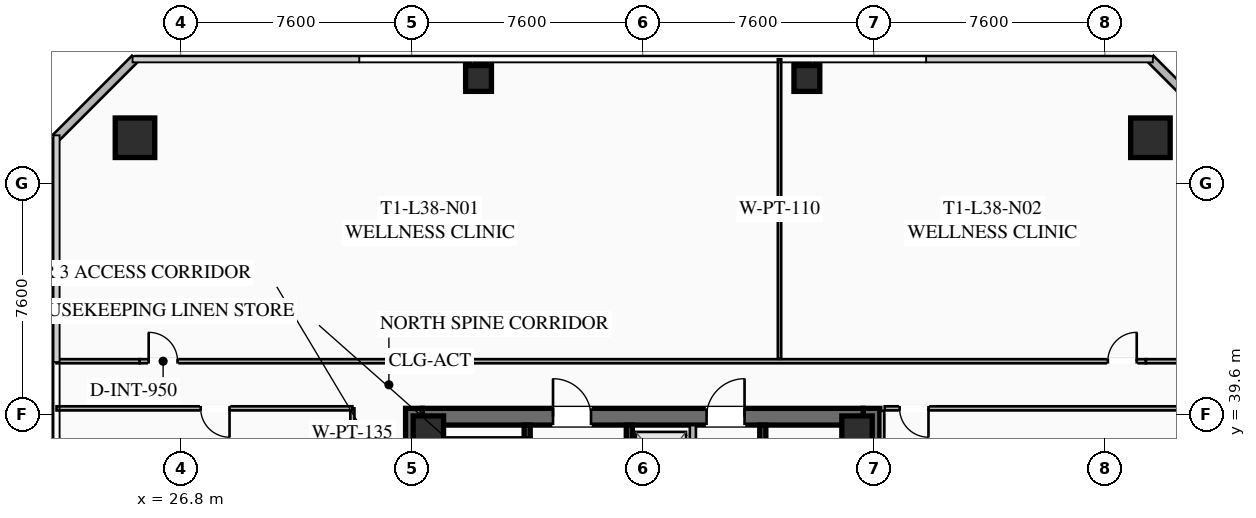
"""IFC4 building model, lengths in metres.
Left out: names, types, materials, properties, quantities, classifications, styles, units other than length and angle.
Written with IfcOpenShell. Run it as: python <this file> out.ifc"""

import sys

from ifc_helpers import new_model, si_unit, direction, frame, frame_2d, origin, origin_2d, place, context, subcontext, project, spatial, rectangle, hollow_rectangle, extrude, element, fill, save


model = new_model("IFC4")
c1 = context("Model", 3, precision=1e-05, world=origin(), true_north=direction((0.0, 1.0)))
c2 = subcontext(c1, "Body", "Model", "MODEL_VIEW")
j1 = project(units=[si_unit("LENGTHUNIT", "METRE"), si_unit("PLANEANGLEUNIT", "RADIAN")], contexts=[c1])
p1 = place(None, origin())
s1 = spatial("IfcSite", under=j1, at=p1, CompositionType="ELEMENT")
p2 = place(p1, origin())
s2 = spatial("IfcBuilding", under=s1, at=p2, CompositionType="ELEMENT")
p3 = place(p2, frame((0.0, 0.0, 142.8)))
s3 = spatial("IfcBuildingStorey", under=s2, at=p3, CompositionType="ELEMENT", Elevation=142.8)
for number, where, z_axis, x_axis in (
    (1, (34.475, 24.2, 0.0), (0.0, 0.0, 1.0), (0.0, 1.0, 0.0)),
    (2, (49.525, 39.8, 0.0), (0.0, 0.0, 1.0), (0.0, -1.0, 0.0)),
):
    element("IfcWall", number, at=place(p3, frame(where, z_axis=z_axis, x_axis=x_axis)), inside=s3, PredefinedType="SHEAR", context=c2, shape_type="SweptSolid", body=[
        extrude(rectangle(XDim=15.6, YDim=0.55, at=frame_2d((7.8, 0.0))), origin(), (0.0, 0.0, 1.0), 3.55),
    ])
p4 = place(p3, frame((34.75, 39.525, 0.0), z_axis=(0.0, 0.0, 1.0), x_axis=(1.0, 0.0, 0.0)))
e3 = element("IfcWall", 3, at=p4, inside=s3, PredefinedType="SHEAR", context=c2, shape_type="SweptSolid", body=[
    extrude(rectangle(XDim=14.5, YDim=0.55, at=frame_2d((7.25, 0.0))), origin(), (0.0, 0.0, 1.0), 3.55),
])
p5 = place(p4, frame((4.3, 0.0, 0.0)))
e4 = element("IfcOpeningElement", 4, at=p5, cuts=e3, PredefinedType="OPENING", context=c2, shape_type="SweptSolid", body=[
    extrude(rectangle(XDim=1.25, YDim=2.25, at=frame_2d((0.625, 1.125))), frame((0.0, 0.285, 0.0), z_axis=(0.0, -1.0, 0.0), x_axis=(1.0, 0.0, 0.0)), (0.0, 0.0, 1.0), 0.57),
])
p6 = place(p4, frame((9.35, 0.0, 0.0)))
e5 = element("IfcOpeningElement", 5, at=p6, cuts=e3, PredefinedType="OPENING", context=c2, shape_type="SweptSolid", body=[
    extrude(rectangle(XDim=1.25, YDim=2.25, at=frame_2d((0.625, 1.125))), frame((0.0, 0.285, 0.0), z_axis=(0.0, -1.0, 0.0), x_axis=(1.0, 0.0, 0.0)), (0.0, 0.0, 1.0), 0.57),
])
for number, where, z_axis, x_axis in (
    (6, (49.05, 39.05, 0.0), (0.0, 0.0, 1.0), (1.0, 0.0, 0.0)),
    (7, (34.95, 39.05, 0.0), (0.0, 0.0, 1.0), (1.0, 0.0, 0.0)),
):
    element("IfcColumn", number, at=place(p3, frame(where, z_axis=z_axis, x_axis=x_axis)), inside=s3, PredefinedType="COLUMN", context=c2, shape_type="SweptSolid", body=[
        extrude(hollow_rectangle(XDim=1.0, YDim=1.0, WallThickness=0.04, at=origin_2d()), origin(), (0.0, 0.0, 1.0), 3.37),
    ])
for number, where, z_axis, x_axis in (
    (8, (58.7, 48.7, 0.0), (0.0, 0.0, 1.0), (1.0, 0.0, 0.0)),
    (9, (25.3, 48.7, 0.0), (0.0, 0.0, 1.0), (1.0, 0.0, 0.0)),
):
    element("IfcColumn", number, at=place(p3, frame(where, z_axis=z_axis, x_axis=x_axis)), inside=s3, PredefinedType="COLUMN", context=c2, shape_type="SweptSolid", body=[
        extrude(hollow_rectangle(XDim=1.3, YDim=1.3, WallThickness=0.05, at=origin_2d()), origin(), (0.0, 0.0, 1.0), 3.37),
    ])
for number, where, z_axis, x_axis in (
    (10, (47.4, 50.65, 0.0), (0.0, 0.0, 1.0), (1.0, 0.0, 0.0)),
    (11, (36.6, 50.65, 0.0), (0.0, 0.0, 1.0), (1.0, 0.0, 0.0)),
):
    element("IfcColumn", number, at=place(p3, frame(where, z_axis=z_axis, x_axis=x_axis)), inside=s3, PredefinedType="COLUMN", context=c2, shape_type="SweptSolid", body=[
        extrude(hollow_rectangle(XDim=0.85, YDim=0.85, WallThickness=0.035, at=origin_2d()), origin(), (0.0, 0.0, 1.0), 3.37),
    ])
for number, where, z_axis, x_axis in (
    (12, (22.7, 48.7, 0.0), (0.0, 0.0, 1.0), (0.707, 0.707, 0.0)),
    (13, (58.7, 51.3, 0.0), (0.0, 0.0, 1.0), (0.707, -0.707, 0.0)),
):
    element("IfcWall", number, at=place(p3, frame(where, z_axis=z_axis, x_axis=x_axis)), inside=s3, PredefinedType="SOLIDWALL", context=c2, shape_type="SweptSolid", body=[
        extrude(rectangle(XDim=3.677, YDim=0.28, at=frame_2d((1.838, 0.0))), origin(), (0.0, 0.0, 1.0), 3.37),
    ])
p7 = place(p3, frame((38.2, 31.2, 0.0), z_axis=(0.0, 0.0, 1.0), x_axis=(0.0, 1.0, 0.0)))
e14 = element("IfcWall", 14, at=p7, inside=s3, PredefinedType="SHEAR", context=c2, shape_type="SweptSolid", body=[
    extrude(rectangle(XDim=8.05, YDim=0.2, at=frame_2d((4.025, 0.0))), origin(), (0.0, 0.0, 1.0), 3.37),
])
p8 = place(p7, frame((0.45, 0.0, 0.0)))
e15 = element("IfcOpeningElement", 15, at=p8, cuts=e14, PredefinedType="OPENING", context=c2, shape_type="SweptSolid", body=[
    extrude(rectangle(XDim=1.15, YDim=2.2, at=frame_2d((0.575, 1.1))), frame((0.0, 0.11, 0.0), z_axis=(0.0, -1.0, 0.0), x_axis=(1.0, 0.0, 0.0)), (0.0, 0.0, 1.0), 0.22),
])
p9 = place(p3, frame((41.56, 24.75, 0.0), z_axis=(0.0, 0.0, 1.0), x_axis=(0.0, 1.0, 0.0)))
e16 = element("IfcWall", 16, at=p9, inside=s3, PredefinedType="SHEAR", context=c2, shape_type="SweptSolid", body=[
    extrude(rectangle(XDim=14.5, YDim=0.2, at=frame_2d((7.25, 0.0))), origin(), (0.0, 0.0, 1.0), 3.37),
])
p10 = place(p3, frame((45.95, 39.25, 0.0), z_axis=(0.0, 0.0, 1.0), x_axis=(0.0, -1.0, 0.0)))
e17 = element("IfcWall", 17, at=p10, inside=s3, PredefinedType="SHEAR", context=c2, shape_type="SweptSolid", body=[
    extrude(rectangle(XDim=6.45, YDim=0.2, at=frame_2d((3.225, 0.0))), origin(), (0.0, 0.0, 1.0), 3.37),
])
p11 = place(p3, frame((43.65, 32.35, 0.0), z_axis=(0.0, 0.0, 1.0), x_axis=(0.0, 1.0, 0.0)))
e18 = element("IfcWall", 18, at=p11, inside=s3, PredefinedType="SOLIDWALL", context=c2, shape_type="SweptSolid", body=[
    extrude(rectangle(XDim=6.9, YDim=0.2, at=frame_2d((3.45, 0.0))), origin(), (0.0, 0.0, 1.0), 3.37),
])
p12 = place(p11, frame((0.575, 0.0, 0.0)))
e19 = element("IfcOpeningElement", 19, at=p12, cuts=e18, PredefinedType="OPENING", context=c2, shape_type="SweptSolid", body=[
    extrude(rectangle(XDim=1.1, YDim=2.2, at=frame_2d((0.55, 1.1))), frame((0.0, 0.11, 0.0), z_axis=(0.0, -1.0, 0.0), x_axis=(1.0, 0.0, 0.0)), (0.0, 0.0, 1.0), 0.22),
])
p13 = place(p11, frame((2.825, 0.0, 0.0)))
e20 = element("IfcOpeningElement", 20, at=p13, cuts=e18, PredefinedType="OPENING", context=c2, shape_type="SweptSolid", body=[
    extrude(rectangle(XDim=1.1, YDim=2.2, at=frame_2d((0.55, 1.1))), frame((0.0, 0.11, 0.0), z_axis=(0.0, -1.0, 0.0), x_axis=(1.0, 0.0, 0.0)), (0.0, 0.0, 1.0), 0.22),
])
p14 = place(p11, frame((5.075, 0.0, 0.0)))
e21 = element("IfcOpeningElement", 21, at=p14, cuts=e18, PredefinedType="OPENING", context=c2, shape_type="SweptSolid", body=[
    extrude(rectangle(XDim=1.1, YDim=2.2, at=frame_2d((0.55, 1.1))), frame((0.0, 0.11, 0.0), z_axis=(0.0, -1.0, 0.0), x_axis=(1.0, 0.0, 0.0)), (0.0, 0.0, 1.0), 0.22),
])
p15 = place(p3, frame((32.45, 35.4, 0.0), z_axis=(0.0, 0.0, 1.0), x_axis=(0.0, 1.0, 0.0)))
e22 = element("IfcWall", 22, at=p15, inside=s3, PredefinedType="PARTITIONING", context=c2, shape_type="SweptSolid", body=[
    extrude(rectangle(XDim=4.4, YDim=0.135, at=frame_2d((2.2, 0.0))), origin(), (0.0, 0.0, 1.0), 2.723),
])
p16 = place(p3, frame((25.45, 41.35, 0.0), z_axis=(0.0, 0.0, 1.0), x_axis=(1.0, 0.0, 0.0)))
e23 = element("IfcWall", 23, at=p16, inside=s3, PredefinedType="PARTITIONING", context=c2, shape_type="SweptSolid", body=[
    extrude(rectangle(XDim=33.1, YDim=0.135, at=frame_2d((16.55, 0.0))), origin(), (0.0, 0.0, 1.0), 2.723),
])
p17 = place(p16, frame((0.3, 0.0, 0.0)))
e24 = element("IfcOpeningElement", 24, at=p17, cuts=e23, PredefinedType="OPENING", context=c2, shape_type="SweptSolid", body=[
    extrude(rectangle(XDim=0.95, YDim=2.05, at=frame_2d((0.475, 1.025))), frame((0.0, 0.077, 0.0), z_axis=(0.0, -1.0, 0.0), x_axis=(1.0, 0.0, 0.0)), (0.0, 0.0, 1.0), 0.155),
])
p18 = place(p16, frame((31.85, 0.0, 0.0)))
e25 = element("IfcOpeningElement", 25, at=p18, cuts=e23, PredefinedType="OPENING", context=c2, shape_type="SweptSolid", body=[
    extrude(rectangle(XDim=0.95, YDim=2.05, at=frame_2d((0.475, 1.025))), frame((0.0, 0.077, 0.0), z_axis=(0.0, -1.0, 0.0), x_axis=(1.0, 0.0, 0.0)), (0.0, 0.0, 1.0), 0.155),
])
for number, where, z_axis, x_axis in (
    (26, (22.72, 41.35, 0.0), (0.0, 0.0, 1.0), (1.0, 0.0, 0.0)),
    (27, (58.55, 41.35, 0.0), (0.0, 0.0, 1.0), (1.0, 0.0, 0.0)),
):
    element("IfcWall", number, at=place(p3, frame(where, z_axis=z_axis, x_axis=x_axis)), inside=s3, PredefinedType="PARTITIONING", context=c2, shape_type="SweptSolid", body=[
        extrude(rectangle(XDim=2.73, YDim=0.135, at=frame_2d((1.365, 0.0))), origin(), (0.0, 0.0, 1.0), 2.723),
    ])
p19 = place(p3, frame((46.5, 41.43, 0.0), z_axis=(0.0, 0.0, 1.0), x_axis=(0.0, 1.0, 0.0)))
e28 = element("IfcWall", 28, at=p19, inside=s3, PredefinedType="PARTITIONING", context=c2, shape_type="SweptSolid", body=[
    extrude(rectangle(XDim=9.85, YDim=0.11, at=frame_2d((4.925, 0.0))), origin(), (0.0, 0.0, 1.0), 2.723),
])
p20 = place(p3, frame((49.88, 39.72, 0.0), z_axis=(0.0, 0.0, 1.0), x_axis=(0.0, -1.0, 0.0)))
e29 = element("IfcWall", 29, at=p20, inside=s3, PredefinedType="PARTITIONING", context=c2, shape_type="SweptSolid", body=[
    extrude(rectangle(XDim=15.44, YDim=0.135, at=frame_2d((7.72, 0.0))), origin(), (0.0, 0.0, 1.0), 2.723),
])
p21 = place(p3, frame((61.13, 39.8, 0.0), z_axis=(0.0, 0.0, 1.0), x_axis=(-1.0, 0.0, 0.0)))
e30 = element("IfcWall", 30, at=p21, inside=s3, PredefinedType="PARTITIONING", context=c2, shape_type="SweptSolid", body=[
    extrude(rectangle(XDim=11.17, YDim=0.135, at=frame_2d((5.585, 0.0))), origin(), (0.0, 0.0, 1.0), 2.723),
])
p22 = place(p21, frame((9.73, 0.0, 0.0)))
e31 = element("IfcOpeningElement", 31, at=p22, cuts=e30, PredefinedType="OPENING", context=c2, shape_type="SweptSolid", body=[
    extrude(rectangle(XDim=0.95, YDim=2.05, at=frame_2d((0.475, 1.025))), frame((0.0, 0.077, 0.0), z_axis=(0.0, -1.0, 0.0), x_axis=(1.0, 0.0, 0.0)), (0.0, 0.0, 1.0), 0.155),
])
p23 = place(p3, frame((32.45, 39.8, 0.0), z_axis=(0.0, 0.0, 1.0), x_axis=(-1.0, 0.0, 0.0)))
e32 = element("IfcWall", 32, at=p23, inside=s3, PredefinedType="PARTITIONING", context=c2, shape_type="SweptSolid", body=[
    extrude(rectangle(XDim=9.73, YDim=0.135, at=frame_2d((4.865, 0.0))), origin(), (0.0, 0.0, 1.0), 2.723),
])
p24 = place(p23, frame((4.04, 0.0, 0.0)))
e33 = element("IfcOpeningElement", 33, at=p24, cuts=e32, PredefinedType="OPENING", context=c2, shape_type="SweptSolid", body=[
    extrude(rectangle(XDim=0.95, YDim=2.05, at=frame_2d((0.475, 1.025))), frame((0.0, 0.077, 0.0), z_axis=(0.0, -1.0, 0.0), x_axis=(1.0, 0.0, 0.0)), (0.0, 0.0, 1.0), 0.155),
])
p25 = place(p5, origin())
e34 = element("IfcDoor", 34, at=p25, inside=s3, OperationType="SINGLE_SWING_LEFT", PredefinedType="DOOR", context=c2, shape_type="SweptSolid", body=[
    extrude(rectangle(XDim=1.25, YDim=2.25, at=frame_2d((0.625, 1.125))), frame((0.0, 0.025, 0.0), z_axis=(0.0, -1.0, 0.0), x_axis=(1.0, 0.0, 0.0)), (0.0, 0.0, 1.0), 0.05),
])
fill(e4, e34)
p26 = place(p6, origin())
e35 = element("IfcDoor", 35, at=p26, inside=s3, OperationType="SINGLE_SWING_RIGHT", PredefinedType="DOOR", context=c2, shape_type="SweptSolid", body=[
    extrude(rectangle(XDim=1.25, YDim=2.25, at=frame_2d((0.625, 1.125))), frame((0.0, 0.025, 0.0), z_axis=(0.0, -1.0, 0.0), x_axis=(1.0, 0.0, 0.0)), (0.0, 0.0, 1.0), 0.05),
])
fill(e5, e35)
p27 = place(p17, origin())
e36 = element("IfcDoor", 36, at=p27, inside=s3, OperationType="SINGLE_SWING_LEFT", PredefinedType="DOOR", context=c2, shape_type="SweptSolid", body=[
    extrude(rectangle(XDim=0.95, YDim=2.05, at=frame_2d((0.475, 1.025))), frame((0.0, 0.025, 0.0), z_axis=(0.0, -1.0, 0.0), x_axis=(1.0, 0.0, 0.0)), (0.0, 0.0, 1.0), 0.05),
])
fill(e24, e36)
p28 = place(p18, origin())
e37 = element("IfcDoor", 37, at=p28, inside=s3, OperationType="SINGLE_SWING_RIGHT", PredefinedType="DOOR", context=c2, shape_type="SweptSolid", body=[
    extrude(rectangle(XDim=0.95, YDim=2.05, at=frame_2d((0.475, 1.025))), frame((0.0, 0.025, 0.0), z_axis=(0.0, -1.0, 0.0), x_axis=(1.0, 0.0, 0.0)), (0.0, 0.0, 1.0), 0.05),
])
fill(e25, e37)
p29 = place(p22, origin())
e38 = element("IfcDoor", 38, at=p29, inside=s3, OperationType="SINGLE_SWING_LEFT", PredefinedType="DOOR", context=c2, shape_type="SweptSolid", body=[
    extrude(rectangle(XDim=0.95, YDim=2.05, at=frame_2d((0.475, 1.025))), frame((0.0, 0.025, 0.0), z_axis=(0.0, -1.0, 0.0), x_axis=(1.0, 0.0, 0.0)), (0.0, 0.0, 1.0), 0.05),
])
fill(e31, e38)
p30 = place(p24, origin())
e39 = element("IfcDoor", 39, at=p30, inside=s3, OperationType="SINGLE_SWING_LEFT", PredefinedType="DOOR", context=c2, shape_type="SweptSolid", body=[
    extrude(rectangle(XDim=0.95, YDim=2.05, at=frame_2d((0.475, 1.025))), frame((0.0, 0.025, 0.0), z_axis=(0.0, -1.0, 0.0), x_axis=(1.0, 0.0, 0.0)), (0.0, 0.0, 1.0), 0.05),
])
fill(e33, e39)
save(model, sys.argv[1])
